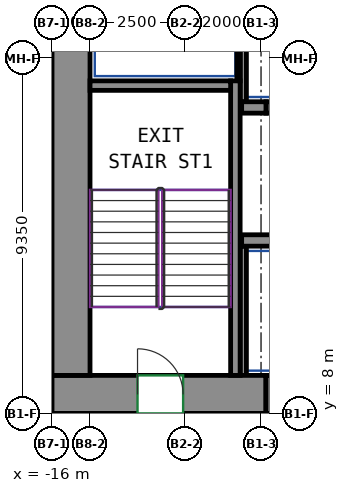
"""IFC4 building model, lengths in metres.
Left out: names, types, materials, properties, quantities, classifications, styles, units other than length and angle.
Written with IfcOpenShell. Run it as: python <this file> out.ifc"""

import sys

from ifc_helpers import new_model, si_unit, direction, frame, frame_2d, origin, place, context, subcontext, project, spatial, rectangle, extrude, source, transform, mapped, element, fill, save


model = new_model("IFC4")
c1 = context("Model", 3, precision=1e-05, world=origin(), true_north=direction((0.0, 1.0)))
c2 = subcontext(c1, "Body", "Model", "MODEL_VIEW")
j1 = project(units=[si_unit("LENGTHUNIT", "METRE"), si_unit("PLANEANGLEUNIT", "RADIAN")], contexts=[c1])
p1 = place(None, origin())
s1 = spatial("IfcSite", under=j1, at=p1, CompositionType="ELEMENT")
p2 = place(p1, origin())
s2 = spatial("IfcBuilding", under=s1, at=p2, CompositionType="ELEMENT")
p3 = place(p2, frame((0.0, 0.0, 39.0)))
s3 = spatial("IfcBuildingStorey", under=s2, at=p3, CompositionType="ELEMENT", Elevation=39.0)
m1 = source(origin(), c2, "Body", "SweptSolid", [
    extrude(rectangle(XDim=5.63, YDim=1.0, at=frame_2d((2.815, 0.0))), origin(), (0.0, 0.0, 1.0), 3.72),
])
p4 = place(p3, frame((-16.0, 8.5, 0.0), z_axis=(0.0, 0.0, 1.0), x_axis=(1.0, 0.0, 0.0)))
e1 = element("IfcWall", 1, at=p4, inside=s3, PredefinedType="SHEAR", context=c2, shape_type="MappedRepresentation", body=[
    mapped(m1, transform((0.0, 0.0, 0.0))),
])
p5 = place(p4, frame((2.25, 0.0, 0.0)))
e2 = element("IfcOpeningElement", 2, at=p5, cuts=e1, PredefinedType="OPENING", context=c2, shape_type="SweptSolid", body=[
    extrude(rectangle(XDim=1.2, YDim=2.1, at=frame_2d((0.6, 1.05))), frame((0.0, 0.51, 0.0), z_axis=(0.0, -1.0, 0.0), x_axis=(1.0, 0.0, 0.0)), (0.0, 0.0, 1.0), 1.02),
])
m2 = source(origin(), c2, "Body", "SweptSolid", [
    extrude(rectangle(XDim=12.0, YDim=1.0, at=frame_2d((6.0, 0.0))), origin(), (0.0, 0.0, 1.0), 3.72),
])
p6 = place(p3, frame((-15.5, 9.0, 0.0), z_axis=(0.0, 0.0, 1.0), x_axis=(0.0, 1.0, 0.0)))
e3 = element("IfcWall", 3, at=p6, inside=s3, PredefinedType="SHEAR", context=c2, shape_type="MappedRepresentation", body=[
    mapped(m2, transform((0.0, 0.0, 0.0))),
])
m3 = source(origin(), c2, "Body", "SweptSolid", [
    extrude(rectangle(XDim=7.75, YDim=0.25, at=frame_2d((3.875, 0.0))), origin(), (0.0, 0.0, 1.0), 3.72),
])
p7 = place(p3, frame((-11.175, 9.0, 0.0), z_axis=(0.0, 0.0, 1.0), x_axis=(0.0, 1.0, 0.0)))
e4 = element("IfcWall", 4, at=p7, inside=s3, PredefinedType="SHEAR", context=c2, shape_type="MappedRepresentation", body=[
    mapped(m3, transform((0.0, 0.0, 0.0))),
])
m4 = source(origin(), c2, "Body", "SweptSolid", [
    extrude(rectangle(XDim=3.7, YDim=0.25, at=frame_2d((1.85, 0.0))), origin(), (0.0, 0.0, 1.0), 3.72),
])
p8 = place(p3, frame((-15.0, 16.625, 0.0), z_axis=(0.0, 0.0, 1.0), x_axis=(1.0, 0.0, 0.0)))
e5 = element("IfcWall", 5, at=p8, inside=s3, PredefinedType="SHEAR", context=c2, shape_type="MappedRepresentation", body=[
    mapped(m4, transform((0.0, 0.0, 0.0))),
])
m5 = source(origin(), c2, "Body", "SweptSolid", [
    extrude(rectangle(XDim=6.0, YDim=0.3, at=frame_2d((3.0, 0.0))), origin(), (0.0, 0.0, 1.0), 3.72),
])
p9 = place(p3, frame((-11.01, 12.55, 0.0), z_axis=(0.0, 0.0, 1.0), x_axis=(1.0, 0.0, 0.0)))
e6 = element("IfcWall", 6, at=p9, inside=s3, PredefinedType="SHEAR", context=c2, shape_type="MappedRepresentation", body=[
    mapped(m5, transform((0.0, 0.0, 0.0))),
])
m6 = source(origin(), c2, "Body", "SweptSolid", [
    extrude(rectangle(XDim=0.64, YDim=0.3, at=frame_2d((0.32, 0.0))), origin(), (0.0, 0.0, 1.0), 3.72),
])
p10 = place(p3, frame((-11.01, 16.05, 0.0), z_axis=(0.0, 0.0, 1.0), x_axis=(1.0, 0.0, 0.0)))
e7 = element("IfcWall", 7, at=p10, inside=s3, PredefinedType="SHEAR", context=c2, shape_type="MappedRepresentation", body=[
    mapped(m6, transform((0.0, 0.0, 0.0))),
])
m7 = source(origin(), c2, "Body", "SweptSolid", [
    extrude(rectangle(XDim=1.4, YDim=0.3, at=frame_2d((0.7, 0.0))), origin(), (0.0, 0.0, 1.0), 3.72),
])
p11 = place(p3, frame((-10.37, 16.05, 0.0), z_axis=(0.0, 0.0, 1.0), x_axis=(1.0, 0.0, 0.0)))
e8 = element("IfcWall", 8, at=p11, inside=s3, PredefinedType="PARTITIONING", context=c2, shape_type="MappedRepresentation", body=[
    mapped(m7, transform((0.0, 0.0, 0.0))),
])
p12 = place(p11, frame((0.15, 0.0, 0.0)))
e9 = element("IfcOpeningElement", 9, at=p12, cuts=e8, PredefinedType="OPENING", context=c2, shape_type="SweptSolid", body=[
    extrude(rectangle(XDim=1.1, YDim=2.1, at=frame_2d((0.55, 1.05))), frame((0.0, 0.16, 0.0), z_axis=(0.0, -1.0, 0.0), x_axis=(1.0, 0.0, 0.0)), (0.0, 0.0, 1.0), 0.32),
])
m8 = source(origin(), c2, "Body", "SweptSolid", [
    extrude(rectangle(XDim=3.275, YDim=0.165, at=frame_2d((1.638, 0.0))), origin(), (0.0, 0.0, 1.0), 3.72),
])
p13 = place(p3, frame((-10.968, 16.2, 0.0), z_axis=(0.0, 0.0, 1.0), x_axis=(0.0, 1.0, 0.0)))
e10 = element("IfcWall", 10, at=p13, inside=s3, PredefinedType="PARTITIONING", context=c2, shape_type="MappedRepresentation", body=[
    mapped(m8, transform((0.0, 0.0, 0.0))),
])
m9 = source(origin(), c2, "Body", "SweptSolid", [
    extrude(rectangle(XDim=2.725, YDim=0.085, at=frame_2d((1.363, 0.0))), origin(), (0.0, 0.0, 1.0), 3.72),
])
p14 = place(p3, frame((-11.093, 16.75, 0.0), z_axis=(0.0, 0.0, 1.0), x_axis=(0.0, 1.0, 0.0)))
e11 = element("IfcWall", 11, at=p14, inside=s3, PredefinedType="PARTITIONING", context=c2, shape_type="MappedRepresentation", body=[
    mapped(m9, transform((0.0, 0.0, 0.0))),
])
m10 = source(origin(), c2, "Body", "SweptSolid", [
    extrude(rectangle(XDim=3.4, YDim=0.165, at=frame_2d((1.7, 0.0))), origin(), (0.0, 0.0, 1.0), 3.72),
])
p15 = place(p3, frame((-10.968, 9.0, 0.0), z_axis=(0.0, 0.0, 1.0), x_axis=(0.0, 1.0, 0.0)))
e12 = element("IfcWall", 12, at=p15, inside=s3, PredefinedType="PARTITIONING", context=c2, shape_type="MappedRepresentation", body=[
    mapped(m10, transform((0.0, 0.0, 0.0))),
])
m11 = source(origin(), c2, "Body", "SweptSolid", [
    extrude(rectangle(XDim=1.4, YDim=1.0, at=frame_2d((0.7, 0.0))), origin(), (0.0, 0.0, 1.0), 2.7),
])
p16 = place(p3, frame((-10.37, 8.5, 0.0), z_axis=(0.0, 0.0, 1.0), x_axis=(1.0, 0.0, 0.0)))
e13 = element("IfcWall", 13, at=p16, inside=s3, PredefinedType="PARTITIONING", context=c2, shape_type="MappedRepresentation", body=[
    mapped(m11, transform((0.0, 0.0, 0.0))),
])
p17 = place(p16, frame((0.25, 0.0, 0.0)))
e14 = element("IfcOpeningElement", 14, at=p17, cuts=e13, PredefinedType="OPENING", context=c2, shape_type="SweptSolid", body=[
    extrude(rectangle(XDim=0.9, YDim=2.1, at=frame_2d((0.45, 1.05))), frame((0.0, 0.51, 0.0), z_axis=(0.0, -1.0, 0.0), x_axis=(1.0, 0.0, 0.0)), (0.0, 0.0, 1.0), 1.02),
])
p18 = place(p3, frame((-14.05, 8.0, 0.0), z_axis=(0.0, 0.0, 1.0), x_axis=(0.0, -1.0, 0.0)))
e15 = element("IfcWall", 15, at=p18, inside=s3, PredefinedType="PARTITIONING", context=c2, shape_type="SweptSolid", body=[
    extrude(rectangle(XDim=4.51, YDim=0.15, at=frame_2d((2.255, 0.0))), origin(), (0.0, 0.0, 1.0), 3.72),
])
p19 = place(p5, origin())
e16 = element("IfcDoor", 16, at=p19, inside=s3, OperationType="DOUBLE_DOOR_SINGLE_SWING", PredefinedType="DOOR", context=c2, shape_type="SweptSolid", body=[
    extrude(rectangle(XDim=1.2, YDim=2.1, at=frame_2d((0.6, 1.05))), frame((0.0, 0.405, 0.0), z_axis=(0.0, -1.0, 0.0), x_axis=(1.0, 0.0, 0.0)), (0.0, 0.0, 1.0), 0.05),
])
fill(e2, e16)
save(model, sys.argv[1])
